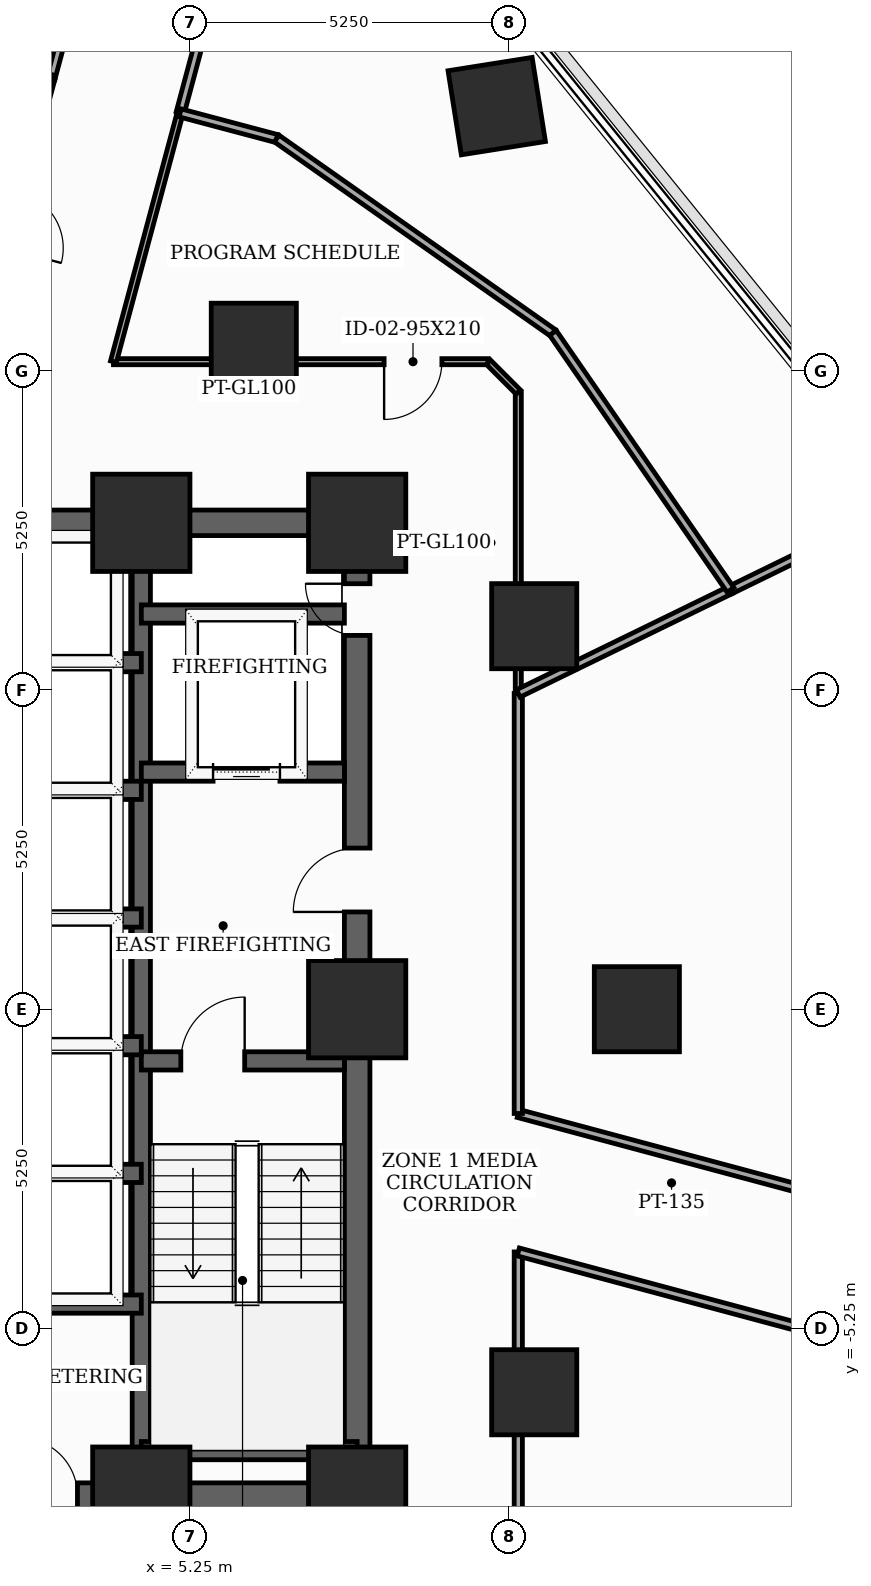
"""IFC4 building model, lengths in metres.
Left out: names, types, materials, properties, quantities, classifications, styles, units other than length and angle.
Written with IfcOpenShell. Run it as: python <this file> out.ifc"""

import sys

from ifc_helpers import new_model, si_unit, direction, frame, frame_2d, origin, origin_2d, place, context, subcontext, project, spatial, rectangle, extrude, element, fill, save


model = new_model("IFC4")
c1 = context("Model", 3, precision=1e-05, world=origin(), true_north=direction((0.0, 1.0)))
c2 = subcontext(c1, "Body", "Model", "MODEL_VIEW")
j1 = project(units=[si_unit("LENGTHUNIT", "METRE"), si_unit("PLANEANGLEUNIT", "RADIAN")], contexts=[c1])
p1 = place(None, origin())
s1 = spatial("IfcSite", under=j1, at=p1, CompositionType="ELEMENT")
p2 = place(p1, origin())
s2 = spatial("IfcBuilding", under=s1, at=p2, CompositionType="ELEMENT")
p3 = place(p2, frame((0.0, 0.0, 74.1)))
s3 = spatial("IfcBuildingStorey", under=s2, at=p3, CompositionType="ELEMENT", Elevation=74.1)
for number, where, z_axis, x_axis in (
    (1, (4.45, -8.0, 0.0), (0.0, 0.0, 1.0), (1.0, 0.0, 0.0)),
    (2, (8.0, -8.0, 0.0), (0.0, 0.0, 1.0), (1.0, 0.0, 0.0)),
    (3, (8.0, 0.0, 0.0), (0.0, 0.0, 1.0), (1.0, 0.0, 0.0)),
    (4, (8.0, 8.0, 0.0), (0.0, 0.0, 1.0), (1.0, 0.0, 0.0)),
    (5, (4.45, 8.0, 0.0), (0.0, 0.0, 1.0), (1.0, 0.0, 0.0)),
):
    element("IfcColumn", number, at=place(p3, frame(where, z_axis=z_axis, x_axis=x_axis)), inside=s3, PredefinedType="COLUMN", context=c2, shape_type="SweptSolid", body=[
        extrude(rectangle(XDim=1.6, YDim=1.6, at=origin_2d()), origin(), (0.0, 0.0, 1.0), 3.7),
    ])
for number, where, z_axis, x_axis in (
    (6, (12.6, 0.0, 0.0), (0.0, 0.0, 1.0), (1.0, 0.0, 0.0)),
    (7, (10.912, 6.3, 0.0), (0.0, 0.0, 1.0), (1.0, 0.0, 0.0)),
    (8, (6.3, 10.912, 0.0), (0.0, 0.0, 1.0), (1.0, 0.0, 0.0)),
    (9, (10.912, -6.3, 0.0), (0.0, 0.0, 1.0), (1.0, 0.0, 0.0)),
    (10, (10.295, 14.853, 0.0), (0.0, 0.0, 1.0), (0.988, 0.156, 0.0)),
):
    element("IfcColumn", number, at=place(p3, frame(where, z_axis=z_axis, x_axis=x_axis)), inside=s3, PredefinedType="COLUMN", context=c2, shape_type="SweptSolid", body=[
        extrude(rectangle(XDim=1.4, YDim=1.4, at=origin_2d()), origin(), (0.0, 0.0, 1.0), 3.7),
    ])
p4 = place(p3, frame((8.0, -8.0, 0.0), z_axis=(0.0, 0.0, 1.0), x_axis=(0.0, 1.0, 0.0)))
e11 = element("IfcWall", 11, at=p4, inside=s3, PredefinedType="SHEAR", context=c2, shape_type="SweptSolid", body=[
    extrude(rectangle(XDim=16.0, YDim=0.42, at=frame_2d((8.0, 0.0))), origin(), (0.0, 0.0, 1.0), 3.5),
])
p5 = place(p4, frame((9.6, 0.0, 0.0)))
e12 = element("IfcOpeningElement", 12, at=p5, cuts=e11, PredefinedType="OPENING", context=c2, shape_type="SweptSolid", body=[
    extrude(rectangle(XDim=1.05, YDim=2.15, at=frame_2d((0.525, 1.075))), frame((0.0, 0.22, 0.0), z_axis=(0.0, -1.0, 0.0), x_axis=(1.0, 0.0, 0.0)), (0.0, 0.0, 1.0), 0.44),
])
p6 = place(p4, frame((14.148, 0.0, 0.0)))
e13 = element("IfcOpeningElement", 13, at=p6, cuts=e11, PredefinedType="OPENING", context=c2, shape_type="SweptSolid", body=[
    extrude(rectangle(XDim=0.85, YDim=2.02, at=frame_2d((0.425, 1.01))), frame((0.0, 0.22, 0.0), z_axis=(0.0, -1.0, 0.0), x_axis=(1.0, 0.0, 0.0)), (0.0, 0.0, 1.0), 0.44),
])
p7 = place(p3, frame((-8.0, -8.0, 0.0), z_axis=(0.0, 0.0, 1.0), x_axis=(1.0, 0.0, 0.0)))
e14 = element("IfcWall", 14, at=p7, inside=s3, PredefinedType="SHEAR", context=c2, shape_type="SweptSolid", body=[
    extrude(rectangle(XDim=16.0, YDim=0.42, at=frame_2d((8.0, 0.0))), origin(), (0.0, 0.0, 1.0), 3.5),
])
p8 = place(p7, frame((4.6, 0.0, 0.0)))
e15 = element("IfcOpeningElement", 15, at=p8, cuts=e14, PredefinedType="OPENING", context=c2, shape_type="SweptSolid", body=[
    extrude(rectangle(XDim=0.95, YDim=2.1, at=frame_2d((0.475, 1.05))), frame((0.0, 0.22, 0.0), z_axis=(0.0, -1.0, 0.0), x_axis=(1.0, 0.0, 0.0)), (0.0, 0.0, 1.0), 0.44),
])
p9 = place(p7, frame((7.52, 0.0, 0.0)))
e16 = element("IfcOpeningElement", 16, at=p9, cuts=e14, PredefinedType="OPENING", context=c2, shape_type="SweptSolid", body=[
    extrude(rectangle(XDim=0.95, YDim=2.1, at=frame_2d((0.475, 1.05))), frame((0.0, 0.22, 0.0), z_axis=(0.0, -1.0, 0.0), x_axis=(1.0, 0.0, 0.0)), (0.0, 0.0, 1.0), 0.44),
])
p10 = place(p7, frame((10.45, 0.0, 0.0)))
e17 = element("IfcOpeningElement", 17, at=p10, cuts=e14, PredefinedType="OPENING", context=c2, shape_type="SweptSolid", body=[
    extrude(rectangle(XDim=0.95, YDim=2.1, at=frame_2d((0.475, 1.05))), frame((0.0, 0.22, 0.0), z_axis=(0.0, -1.0, 0.0), x_axis=(1.0, 0.0, 0.0)), (0.0, 0.0, 1.0), 0.44),
])
p11 = place(p3, frame((-8.0, 8.0, 0.0), z_axis=(0.0, 0.0, 1.0), x_axis=(1.0, 0.0, 0.0)))
e18 = element("IfcWall", 18, at=p11, inside=s3, PredefinedType="SHEAR", context=c2, shape_type="SweptSolid", body=[
    extrude(rectangle(XDim=16.0, YDim=0.42, at=frame_2d((8.0, 0.0))), origin(), (0.0, 0.0, 1.0), 3.5),
])
p12 = place(p11, frame((7.1, 0.0, 0.0)))
e19 = element("IfcOpeningElement", 19, at=p12, cuts=e18, PredefinedType="OPENING", context=c2, shape_type="SweptSolid", body=[
    extrude(rectangle(XDim=1.8, YDim=2.15, at=frame_2d((0.9, 1.075))), frame((0.0, 0.22, 0.0), z_axis=(0.0, -1.0, 0.0), x_axis=(1.0, 0.0, 0.0)), (0.0, 0.0, 1.0), 0.44),
])
p13 = place(p3, frame((4.45, -7.79, 0.0), z_axis=(0.0, 0.0, 1.0), x_axis=(0.0, 1.0, 0.0)))
e20 = element("IfcWall", 20, at=p13, inside=s3, PredefinedType="SHEAR", context=c2, shape_type="SweptSolid", body=[
    extrude(rectangle(XDim=15.58, YDim=0.3, at=frame_2d((7.79, 0.0))), origin(), (0.0, 0.0, 1.0), 3.5),
])
p14 = place(p3, frame((4.45, -0.85, 0.0), z_axis=(0.0, 0.0, 1.0), x_axis=(1.0, 0.0, 0.0)))
e21 = element("IfcWall", 21, at=p14, inside=s3, PredefinedType="SHEAR", context=c2, shape_type="SweptSolid", body=[
    extrude(rectangle(XDim=3.34, YDim=0.3, at=frame_2d((1.67, 0.0))), origin(), (0.0, 0.0, 1.0), 3.5),
])
p15 = place(p14, frame((0.65, 0.0, 0.0)))
e22 = element("IfcOpeningElement", 22, at=p15, cuts=e21, PredefinedType="OPENING", context=c2, shape_type="SweptSolid", body=[
    extrude(rectangle(XDim=1.05, YDim=2.15, at=frame_2d((0.525, 1.075))), frame((0.0, 0.16, 0.0), z_axis=(0.0, -1.0, 0.0), x_axis=(1.0, 0.0, 0.0)), (0.0, 0.0, 1.0), 0.32),
])
p16 = place(p3, frame((4.45, -7.26, 0.0), z_axis=(0.0, 0.0, 1.0), x_axis=(1.0, 0.0, 0.0)))
e23 = element("IfcWall", 23, at=p16, inside=s3, PredefinedType="SHEAR", context=c2, shape_type="SweptSolid", body=[
    extrude(rectangle(XDim=3.55, YDim=0.3, at=frame_2d((1.775, 0.0))), origin(), (0.0, 0.0, 1.0), 3.5),
])
p17 = place(p3, frame((4.45, 3.9, 0.0), z_axis=(0.0, 0.0, 1.0), x_axis=(1.0, 0.0, 0.0)))
e24 = element("IfcWall", 24, at=p17, inside=s3, PredefinedType="SHEAR", context=c2, shape_type="SweptSolid", body=[
    extrude(rectangle(XDim=3.34, YDim=0.3, at=frame_2d((1.67, 0.0))), origin(), (0.0, 0.0, 1.0), 3.5),
])
p18 = place(p17, frame((1.18, 0.0, 0.0)))
e25 = element("IfcOpeningElement", 25, at=p18, cuts=e24, PredefinedType="OPENING", context=c2, shape_type="SweptSolid", body=[
    extrude(rectangle(XDim=1.1, YDim=2.1, at=frame_2d((0.55, 1.05))), frame((0.0, 0.16, 0.0), z_axis=(0.0, -1.0, 0.0), x_axis=(1.0, 0.0, 0.0)), (0.0, 0.0, 1.0), 0.32),
])
p19 = place(p3, frame((4.45, 6.5, 0.0), z_axis=(0.0, 0.0, 1.0), x_axis=(1.0, 0.0, 0.0)))
e26 = element("IfcWall", 26, at=p19, inside=s3, PredefinedType="SHEAR", context=c2, shape_type="SweptSolid", body=[
    extrude(rectangle(XDim=3.34, YDim=0.3, at=frame_2d((1.67, 0.0))), origin(), (0.0, 0.0, 1.0), 3.5),
])
p20 = place(p3, frame((-4.45, -4.85, 0.0), z_axis=(0.0, 0.0, 1.0), x_axis=(1.0, 0.0, 0.0)))
e27 = element("IfcWall", 27, at=p20, inside=s3, PredefinedType="SHEAR", context=c2, shape_type="SweptSolid", body=[
    extrude(rectangle(XDim=8.9, YDim=0.3, at=frame_2d((4.45, 0.0))), origin(), (0.0, 0.0, 1.0), 3.5),
])
for number, where, z_axis, x_axis in (
    (28, (1.68, 1.5, 0.0), (0.0, 0.0, 1.0), (1.0, 0.0, 0.0)),
    (29, (1.68, 3.6, 0.0), (0.0, 0.0, 1.0), (1.0, 0.0, 0.0)),
    (30, (1.68, 5.7, 0.0), (0.0, 0.0, 1.0), (1.0, 0.0, 0.0)),
    (31, (1.68, -2.7, 0.0), (0.0, 0.0, 1.0), (1.0, 0.0, 0.0)),
    (32, (1.68, -0.6, 0.0), (0.0, 0.0, 1.0), (1.0, 0.0, 0.0)),
):
    element("IfcWall", number, at=place(p3, frame(where, z_axis=z_axis, x_axis=x_axis)), inside=s3, PredefinedType="SHEAR", context=c2, shape_type="SweptSolid", body=[
        extrude(rectangle(XDim=2.77, YDim=0.3, at=frame_2d((1.385, 0.0))), origin(), (0.0, 0.0, 1.0), 3.5),
    ])
p21 = place(p3, frame((10.65, -10.15, 0.0), z_axis=(0.0, 0.0, 1.0), x_axis=(0.0, 1.0, 0.0)))
e33 = element("IfcWall", 33, at=p21, inside=s3, PredefinedType="PARTITIONING", context=c2, shape_type="SweptSolid", body=[
    extrude(rectangle(XDim=6.158, YDim=0.135, at=frame_2d((3.079, 0.0))), origin(), (0.0, 0.0, 1.0), 2.785),
])
p22 = place(p3, frame((10.65, -3.992, 0.0), z_axis=(0.0, 0.0, 1.0), x_axis=(0.965906888357, -0.258889712088, 0.0)))
e34 = element("IfcWall", 34, at=p22, inside=s3, PredefinedType="PARTITIONING", context=c2, shape_type="SweptSolid", body=[
    extrude(rectangle(XDim=11.28, YDim=0.135, at=frame_2d((5.64, 0.0))), origin(), (0.0, 0.0, 1.0), 2.785),
])
p23 = place(p3, frame((22.115, -4.787, 0.0), z_axis=(0.0, 0.0, 1.0), x_axis=(-0.965926659449, 0.258815935688, 0.0)))
e35 = element("IfcWall", 35, at=p23, inside=s3, PredefinedType="PARTITIONING", context=c2, shape_type="SweptSolid", body=[
    extrude(rectangle(XDim=11.87, YDim=0.135, at=frame_2d((5.935, 0.0))), origin(), (0.0, 0.0, 1.0), 2.785),
])
p24 = place(p23, frame((5.46, 0.0, 0.0)))
e36 = element("IfcOpeningElement", 36, at=p24, cuts=e35, PredefinedType="OPENING", context=c2, shape_type="SweptSolid", body=[
    extrude(rectangle(XDim=0.95, YDim=2.1, at=frame_2d((0.475, 1.05))), frame((0.0, 0.077, 0.0), z_axis=(0.0, -1.0, 0.0), x_axis=(1.0, 0.0, 0.0)), (0.0, 0.0, 1.0), 0.155),
])
p25 = place(p3, frame((10.65, -1.715, 0.0), z_axis=(0.0, 0.0, 1.0), x_axis=(0.0, 1.0, 0.0)))
e37 = element("IfcWall", 37, at=p25, inside=s3, PredefinedType="PARTITIONING", context=c2, shape_type="SweptSolid", body=[
    extrude(rectangle(XDim=6.909, YDim=0.135, at=frame_2d((3.455, 0.0))), origin(), (0.0, 0.0, 1.0), 2.785),
])
p26 = place(p3, frame((2.963, 15.306, 0.0), z_axis=(0.0, 0.0, 1.0), x_axis=(-0.25886350996, -0.965913910869, 0.0)))
e38 = element("IfcWall", 38, at=p26, inside=s3, PredefinedType="PARTITIONING", context=c2, shape_type="SweptSolid", body=[
    extrude(rectangle(XDim=4.82, YDim=0.135, at=frame_2d((2.41, 0.0))), origin(), (0.0, 0.0, 1.0), 2.785),
])
p27 = place(p26, frame((1.935, 0.0, 0.0)))
e39 = element("IfcOpeningElement", 39, at=p27, cuts=e38, PredefinedType="OPENING", context=c2, shape_type="SweptSolid", body=[
    extrude(rectangle(XDim=0.95, YDim=2.1, at=frame_2d((0.475, 1.05))), frame((0.0, 0.077, 0.0), z_axis=(0.0, -1.0, 0.0), x_axis=(1.0, 0.0, 0.0)), (0.0, 0.0, 1.0), 0.155),
])
p28 = place(p3, frame((5.089, 14.742, 0.0), z_axis=(0.0, 0.0, 1.0), x_axis=(0.258768350918, 0.965939408329, 0.0)))
e40 = element("IfcWall", 40, at=p28, inside=s3, PredefinedType="PARTITIONING", context=c2, shape_type="SweptSolid", body=[
    extrude(rectangle(XDim=5.043, YDim=0.135, at=frame_2d((2.521, 0.0))), origin(), (0.0, 0.0, 1.0), 2.925),
])
p29 = place(p3, frame((4.269, 20.183, 0.0), z_axis=(0.0, 0.0, 1.0), x_axis=(-0.258691774004, -0.965959919491, 0.0)))
e41 = element("IfcWall", 41, at=p29, inside=s3, PredefinedType="PARTITIONING", context=c2, shape_type="SweptSolid", body=[
    extrude(rectangle(XDim=5.049, YDim=0.135, at=frame_2d((2.524, 0.0))), origin(), (0.0, 0.0, 1.0), 3.085),
])
p30 = place(p29, frame((2.049, 0.0, 0.0)))
e42 = element("IfcOpeningElement", 42, at=p30, cuts=e41, PredefinedType="OPENING", context=c2, shape_type="SweptSolid", body=[
    extrude(rectangle(XDim=0.95, YDim=2.1, at=frame_2d((0.475, 1.05))), frame((0.0, 0.077, 0.0), z_axis=(0.0, -1.0, 0.0), x_axis=(1.0, 0.0, 0.0)), (0.0, 0.0, 1.0), 0.155),
])
p31 = place(p3, frame((10.65, 5.194, 0.0), z_axis=(0.0, 0.0, 1.0), x_axis=(0.0, 1.0, 0.0)))
e43 = element("IfcWall", 43, at=p31, inside=s3, PredefinedType="MOVABLE", context=c2, shape_type="SweptSolid", body=[
    extrude(rectangle(XDim=4.956, YDim=0.1, at=frame_2d((2.478, 0.0))), origin(), (0.0, 0.0, 1.0), 2.785),
])
p32 = place(p3, frame((10.65, 10.15, 0.0), z_axis=(0.0, 0.0, 1.0), x_axis=(-0.707106781187, 0.707106781187, 0.0)))
e44 = element("IfcWall", 44, at=p32, inside=s3, PredefinedType="MOVABLE", context=c2, shape_type="SweptSolid", body=[
    extrude(rectangle(XDim=0.707, YDim=0.1, at=frame_2d((0.354, 0.0))), origin(), (0.0, 0.0, 1.0), 3.5),
])
p33 = place(p3, frame((10.15, 10.65, 0.0), z_axis=(0.0, 0.0, 1.0), x_axis=(-1.0, 0.0, 0.0)))
e45 = element("IfcWall", 45, at=p33, inside=s3, PredefinedType="MOVABLE", context=c2, shape_type="SweptSolid", body=[
    extrude(rectangle(XDim=6.158, YDim=0.1, at=frame_2d((3.079, 0.0))), origin(), (0.0, 0.0, 1.0), 2.785),
])
p34 = place(p33, frame((0.757, 0.0, 0.0)))
e46 = element("IfcOpeningElement", 46, at=p34, cuts=e45, PredefinedType="OPENING", context=c2, shape_type="SweptSolid", body=[
    extrude(rectangle(XDim=0.95, YDim=2.1, at=frame_2d((0.475, 1.05))), frame((0.0, 0.06, 0.0), z_axis=(0.0, -1.0, 0.0), x_axis=(1.0, 0.0, 0.0)), (0.0, 0.0, 1.0), 0.12),
])
p35 = place(p3, frame((3.992, 10.65, 0.0), z_axis=(0.0, 0.0, 1.0), x_axis=(0.258975157658, 0.965883982534, 0.0)))
e47 = element("IfcWall", 47, at=p35, inside=s3, PredefinedType="MOVABLE", context=c2, shape_type="SweptSolid", body=[
    extrude(rectangle(XDim=4.237, YDim=0.1, at=frame_2d((2.118, 0.0))), origin(), (0.0, 0.0, 1.0), 2.785),
])
p36 = place(p3, frame((17.082, 8.332, 0.0), z_axis=(0.0, 0.0, 1.0), x_axis=(-0.898652301999, -0.438661646503, 0.0)))
e48 = element("IfcWall", 48, at=p36, inside=s3, PredefinedType="PARTITIONING", context=c2, shape_type="SweptSolid", body=[
    extrude(rectangle(XDim=3.274, YDim=0.135, at=frame_2d((1.637, 0.0))), origin(), (0.0, 0.0, 1.0), 2.785),
])
p37 = place(p3, frame((14.14, 6.896, 0.0), z_axis=(0.0, 0.0, 1.0), x_axis=(-0.898822220958, -0.438313375467, 0.0)))
e49 = element("IfcWall", 49, at=p37, inside=s3, PredefinedType="PARTITIONING", context=c2, shape_type="SweptSolid", body=[
    extrude(rectangle(XDim=3.883, YDim=0.135, at=frame_2d((1.941, 0.0))), origin(), (0.0, 0.0, 1.0), 2.785),
])
p38 = place(p3, frame((5.089, 14.742, 0.0), z_axis=(0.0, 0.0, 1.0), x_axis=(0.966471299447, -0.256774662584, 0.0)))
e50 = element("IfcWall", 50, at=p38, inside=s3, PredefinedType="PARTITIONING", context=c2, shape_type="SweptSolid", body=[
    extrude(rectangle(XDim=1.643, YDim=0.135, at=frame_2d((0.822, 0.0))), origin(), (0.0, 0.0, 1.0), 3.085),
])
p39 = place(p3, frame((6.677, 14.32, 0.0), z_axis=(0.0, 0.0, 1.0), x_axis=(0.817854672362, -0.575424829926, 0.0)))
e51 = element("IfcWall", 51, at=p39, inside=s3, PredefinedType="PARTITIONING", context=c2, shape_type="SweptSolid", body=[
    extrude(rectangle(XDim=5.556, YDim=0.135, at=frame_2d((2.778, 0.0))), origin(), (0.0, 0.0, 1.0), 2.775),
])
p40 = place(p3, frame((11.221, 11.123, 0.0), z_axis=(0.0, 0.0, 1.0), x_axis=(0.568225964568, -0.822872561938, 0.0)))
e52 = element("IfcWall", 52, at=p40, inside=s3, PredefinedType="PARTITIONING", context=c2, shape_type="SweptSolid", body=[
    extrude(rectangle(XDim=5.137, YDim=0.135, at=frame_2d((2.568, 0.0))), origin(), (0.0, 0.0, 1.0), 2.785),
])
p41 = place(p5, origin())
e53 = element("IfcDoor", 53, at=p41, inside=s3, OperationType="SINGLE_SWING_LEFT", PredefinedType="DOOR", context=c2, shape_type="SweptSolid", body=[
    extrude(rectangle(XDim=1.05, YDim=2.15, at=frame_2d((0.525, 1.075))), frame((0.0, 0.025, 0.0), z_axis=(0.0, -1.0, 0.0), x_axis=(1.0, 0.0, 0.0)), (0.0, 0.0, 1.0), 0.05),
])
fill(e12, e53)
p42 = place(p6, origin())
e54 = element("IfcDoor", 54, at=p42, inside=s3, OperationType="SINGLE_SWING_RIGHT", PredefinedType="TRAPDOOR", context=c2, shape_type="SweptSolid", body=[
    extrude(rectangle(XDim=0.85, YDim=2.02, at=frame_2d((0.425, 1.01))), frame((0.0, 0.025, 0.0), z_axis=(0.0, -1.0, 0.0), x_axis=(1.0, 0.0, 0.0)), (0.0, 0.0, 1.0), 0.05),
])
fill(e13, e54)
p43 = place(p10, origin())
e55 = element("IfcDoor", 55, at=p43, inside=s3, OperationType="SINGLE_SWING_LEFT", PredefinedType="DOOR", context=c2, shape_type="SweptSolid", body=[
    extrude(rectangle(XDim=0.95, YDim=2.1, at=frame_2d((0.475, 1.05))), frame((0.0, 0.025, 0.0), z_axis=(0.0, -1.0, 0.0), x_axis=(1.0, 0.0, 0.0)), (0.0, 0.0, 1.0), 0.05),
])
fill(e17, e55)
p44 = place(p15, origin())
e56 = element("IfcDoor", 56, at=p44, inside=s3, OperationType="SINGLE_SWING_RIGHT", PredefinedType="DOOR", context=c2, shape_type="SweptSolid", body=[
    extrude(rectangle(XDim=1.05, YDim=2.15, at=frame_2d((0.525, 1.075))), frame((0.0, 0.025, 0.0), z_axis=(0.0, -1.0, 0.0), x_axis=(1.0, 0.0, 0.0)), (0.0, 0.0, 1.0), 0.05),
])
fill(e22, e56)
p45 = place(p18, origin())
e57 = element("IfcDoor", 57, at=p45, inside=s3, OperationType="SLIDING_TO_LEFT", PredefinedType="DOOR", context=c2, shape_type="SweptSolid", body=[
    extrude(rectangle(XDim=1.1, YDim=2.1, at=frame_2d((0.55, 1.05))), frame((0.0, 0.025, 0.0), z_axis=(0.0, -1.0, 0.0), x_axis=(1.0, 0.0, 0.0)), (0.0, 0.0, 1.0), 0.05),
])
fill(e25, e57)
p46 = place(p34, origin())
e58 = element("IfcDoor", 58, at=p46, inside=s3, OperationType="SINGLE_SWING_RIGHT", PredefinedType="DOOR", context=c2, shape_type="SweptSolid", body=[
    extrude(rectangle(XDim=0.95, YDim=2.1, at=frame_2d((0.475, 1.05))), frame((0.0, 0.025, 0.0), z_axis=(0.0, -1.0, 0.0), x_axis=(1.0, 0.0, 0.0)), (0.0, 0.0, 1.0), 0.05),
])
fill(e46, e58)
save(model, sys.argv[1])
